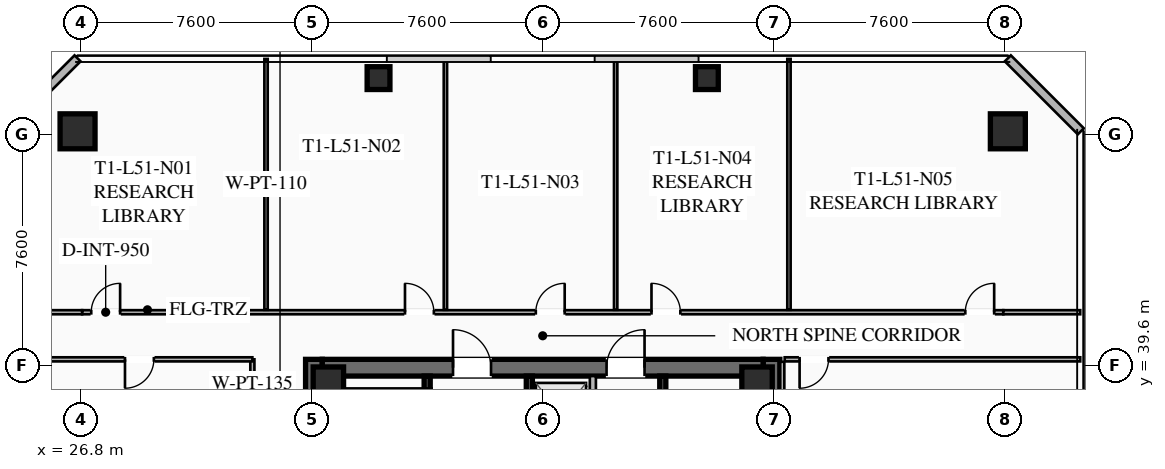
"""IFC4 building model, lengths in metres.
Left out: names, types, materials, properties, quantities, classifications, styles, units other than length and angle.
Written with IfcOpenShell. Run it as: python <this file> out.ifc"""

import sys

from ifc_helpers import new_model, si_unit, direction, frame, frame_2d, origin, origin_2d, place, context, subcontext, project, spatial, rectangle, hollow_rectangle, extrude, element, fill, save


model = new_model("IFC4")
c1 = context("Model", 3, precision=1e-05, world=origin(), true_north=direction((0.0, 1.0)))
c2 = subcontext(c1, "Body", "Model", "MODEL_VIEW")
j1 = project(units=[si_unit("LENGTHUNIT", "METRE"), si_unit("PLANEANGLEUNIT", "RADIAN")], contexts=[c1])
p1 = place(None, origin())
s1 = spatial("IfcSite", under=j1, at=p1, CompositionType="ELEMENT")
p2 = place(p1, origin())
s2 = spatial("IfcBuilding", under=s1, at=p2, CompositionType="ELEMENT")
p3 = place(p2, frame((0.0, 0.0, 188.95)))
s3 = spatial("IfcBuildingStorey", under=s2, at=p3, CompositionType="ELEMENT", Elevation=188.95)
for number, where, z_axis, x_axis in (
    (1, (34.475, 24.2, 0.0), (0.0, 0.0, 1.0), (0.0, 1.0, 0.0)),
    (2, (49.525, 39.8, 0.0), (0.0, 0.0, 1.0), (0.0, -1.0, 0.0)),
):
    element("IfcWall", number, at=place(p3, frame(where, z_axis=z_axis, x_axis=x_axis)), inside=s3, PredefinedType="SHEAR", context=c2, shape_type="SweptSolid", body=[
        extrude(rectangle(XDim=15.6, YDim=0.55, at=frame_2d((7.8, 0.0))), origin(), (0.0, 0.0, 1.0), 3.55),
    ])
p4 = place(p3, frame((34.75, 39.525, 0.0), z_axis=(0.0, 0.0, 1.0), x_axis=(1.0, 0.0, 0.0)))
e3 = element("IfcWall", 3, at=p4, inside=s3, PredefinedType="SHEAR", context=c2, shape_type="SweptSolid", body=[
    extrude(rectangle(XDim=14.5, YDim=0.55, at=frame_2d((7.25, 0.0))), origin(), (0.0, 0.0, 1.0), 3.55),
])
p5 = place(p4, frame((4.3, 0.0, 0.0)))
e4 = element("IfcOpeningElement", 4, at=p5, cuts=e3, PredefinedType="OPENING", context=c2, shape_type="SweptSolid", body=[
    extrude(rectangle(XDim=1.25, YDim=2.25, at=frame_2d((0.625, 1.125))), frame((0.0, 0.285, 0.0), z_axis=(0.0, -1.0, 0.0), x_axis=(1.0, 0.0, 0.0)), (0.0, 0.0, 1.0), 0.57),
])
p6 = place(p4, frame((9.35, 0.0, 0.0)))
e5 = element("IfcOpeningElement", 5, at=p6, cuts=e3, PredefinedType="OPENING", context=c2, shape_type="SweptSolid", body=[
    extrude(rectangle(XDim=1.25, YDim=2.25, at=frame_2d((0.625, 1.125))), frame((0.0, 0.285, 0.0), z_axis=(0.0, -1.0, 0.0), x_axis=(1.0, 0.0, 0.0)), (0.0, 0.0, 1.0), 0.57),
])
for number, where, z_axis, x_axis in (
    (6, (49.05, 39.05, 0.0), (0.0, 0.0, 1.0), (1.0, 0.0, 0.0)),
    (7, (34.95, 39.05, 0.0), (0.0, 0.0, 1.0), (1.0, 0.0, 0.0)),
):
    element("IfcColumn", number, at=place(p3, frame(where, z_axis=z_axis, x_axis=x_axis)), inside=s3, PredefinedType="COLUMN", context=c2, shape_type="SweptSolid", body=[
        extrude(hollow_rectangle(XDim=1.0, YDim=1.0, WallThickness=0.04, at=origin_2d()), origin(), (0.0, 0.0, 1.0), 3.37),
    ])
for number, where, z_axis, x_axis in (
    (8, (57.3, 47.3, 0.0), (0.0, 0.0, 1.0), (1.0, 0.0, 0.0)),
    (9, (26.7, 47.3, 0.0), (0.0, 0.0, 1.0), (1.0, 0.0, 0.0)),
):
    element("IfcColumn", number, at=place(p3, frame(where, z_axis=z_axis, x_axis=x_axis)), inside=s3, PredefinedType="COLUMN", context=c2, shape_type="SweptSolid", body=[
        extrude(hollow_rectangle(XDim=1.15, YDim=1.15, WallThickness=0.045, at=origin_2d()), origin(), (0.0, 0.0, 1.0), 3.37),
    ])
for number, where, z_axis, x_axis in (
    (10, (47.4, 49.05, 0.0), (0.0, 0.0, 1.0), (1.0, 0.0, 0.0)),
    (11, (36.6, 49.05, 0.0), (0.0, 0.0, 1.0), (1.0, 0.0, 0.0)),
):
    element("IfcColumn", number, at=place(p3, frame(where, z_axis=z_axis, x_axis=x_axis)), inside=s3, PredefinedType="COLUMN", context=c2, shape_type="SweptSolid", body=[
        extrude(hollow_rectangle(XDim=0.75, YDim=0.75, WallThickness=0.032, at=origin_2d()), origin(), (0.0, 0.0, 1.0), 3.37),
    ])
for number, where, z_axis, x_axis in (
    (12, (24.3, 47.3, 0.0), (0.0, 0.0, 1.0), (0.707, 0.707, 0.0)),
    (13, (57.3, 49.7, 0.0), (0.0, 0.0, 1.0), (0.707, -0.707, 0.0)),
):
    element("IfcWall", number, at=place(p3, frame(where, z_axis=z_axis, x_axis=x_axis)), inside=s3, PredefinedType="SOLIDWALL", context=c2, shape_type="SweptSolid", body=[
        extrude(rectangle(XDim=3.394, YDim=0.28, at=frame_2d((1.697, 0.0))), origin(), (0.0, 0.0, 1.0), 3.37),
    ])
p7 = place(p3, frame((38.2, 31.2, 0.0), z_axis=(0.0, 0.0, 1.0), x_axis=(0.0, 1.0, 0.0)))
e14 = element("IfcWall", 14, at=p7, inside=s3, PredefinedType="SHEAR", context=c2, shape_type="SweptSolid", body=[
    extrude(rectangle(XDim=8.05, YDim=0.2, at=frame_2d((4.025, 0.0))), origin(), (0.0, 0.0, 1.0), 3.37),
])
p8 = place(p7, frame((0.45, 0.0, 0.0)))
e15 = element("IfcOpeningElement", 15, at=p8, cuts=e14, PredefinedType="OPENING", context=c2, shape_type="SweptSolid", body=[
    extrude(rectangle(XDim=1.15, YDim=2.2, at=frame_2d((0.575, 1.1))), frame((0.0, 0.11, 0.0), z_axis=(0.0, -1.0, 0.0), x_axis=(1.0, 0.0, 0.0)), (0.0, 0.0, 1.0), 0.22),
])
p9 = place(p3, frame((41.56, 24.75, 0.0), z_axis=(0.0, 0.0, 1.0), x_axis=(0.0, 1.0, 0.0)))
e16 = element("IfcWall", 16, at=p9, inside=s3, PredefinedType="SHEAR", context=c2, shape_type="SweptSolid", body=[
    extrude(rectangle(XDim=14.5, YDim=0.2, at=frame_2d((7.25, 0.0))), origin(), (0.0, 0.0, 1.0), 3.37),
])
p10 = place(p3, frame((45.95, 39.25, 0.0), z_axis=(0.0, 0.0, 1.0), x_axis=(0.0, -1.0, 0.0)))
e17 = element("IfcWall", 17, at=p10, inside=s3, PredefinedType="SHEAR", context=c2, shape_type="SweptSolid", body=[
    extrude(rectangle(XDim=6.45, YDim=0.2, at=frame_2d((3.225, 0.0))), origin(), (0.0, 0.0, 1.0), 3.37),
])
p11 = place(p3, frame((43.65, 32.35, 0.0), z_axis=(0.0, 0.0, 1.0), x_axis=(0.0, 1.0, 0.0)))
e18 = element("IfcWall", 18, at=p11, inside=s3, PredefinedType="SOLIDWALL", context=c2, shape_type="SweptSolid", body=[
    extrude(rectangle(XDim=6.9, YDim=0.2, at=frame_2d((3.45, 0.0))), origin(), (0.0, 0.0, 1.0), 3.37),
])
p12 = place(p11, frame((0.575, 0.0, 0.0)))
e19 = element("IfcOpeningElement", 19, at=p12, cuts=e18, PredefinedType="OPENING", context=c2, shape_type="SweptSolid", body=[
    extrude(rectangle(XDim=1.1, YDim=2.2, at=frame_2d((0.55, 1.1))), frame((0.0, 0.11, 0.0), z_axis=(0.0, -1.0, 0.0), x_axis=(1.0, 0.0, 0.0)), (0.0, 0.0, 1.0), 0.22),
])
p13 = place(p11, frame((2.825, 0.0, 0.0)))
e20 = element("IfcOpeningElement", 20, at=p13, cuts=e18, PredefinedType="OPENING", context=c2, shape_type="SweptSolid", body=[
    extrude(rectangle(XDim=1.1, YDim=2.2, at=frame_2d((0.55, 1.1))), frame((0.0, 0.11, 0.0), z_axis=(0.0, -1.0, 0.0), x_axis=(1.0, 0.0, 0.0)), (0.0, 0.0, 1.0), 0.22),
])
p14 = place(p11, frame((5.075, 0.0, 0.0)))
e21 = element("IfcOpeningElement", 21, at=p14, cuts=e18, PredefinedType="OPENING", context=c2, shape_type="SweptSolid", body=[
    extrude(rectangle(XDim=1.1, YDim=2.2, at=frame_2d((0.55, 1.1))), frame((0.0, 0.11, 0.0), z_axis=(0.0, -1.0, 0.0), x_axis=(1.0, 0.0, 0.0)), (0.0, 0.0, 1.0), 0.22),
])
p15 = place(p3, frame((32.45, 35.4, 0.0), z_axis=(0.0, 0.0, 1.0), x_axis=(0.0, 1.0, 0.0)))
e22 = element("IfcWall", 22, at=p15, inside=s3, PredefinedType="PARTITIONING", context=c2, shape_type="SweptSolid", body=[
    extrude(rectangle(XDim=4.4, YDim=0.135, at=frame_2d((2.2, 0.0))), origin(), (0.0, 0.0, 1.0), 2.723),
])
p16 = place(p3, frame((26.85, 41.35, 0.0), z_axis=(0.0, 0.0, 1.0), x_axis=(1.0, 0.0, 0.0)))
e23 = element("IfcWall", 23, at=p16, inside=s3, PredefinedType="PARTITIONING", context=c2, shape_type="SweptSolid", body=[
    extrude(rectangle(XDim=30.3, YDim=0.135, at=frame_2d((15.15, 0.0))), origin(), (0.0, 0.0, 1.0), 2.723),
])
p17 = place(p16, frame((0.3, 0.0, 0.0)))
e24 = element("IfcOpeningElement", 24, at=p17, cuts=e23, PredefinedType="OPENING", context=c2, shape_type="SweptSolid", body=[
    extrude(rectangle(XDim=0.95, YDim=2.05, at=frame_2d((0.475, 1.025))), frame((0.0, 0.077, 0.0), z_axis=(0.0, -1.0, 0.0), x_axis=(1.0, 0.0, 0.0)), (0.0, 0.0, 1.0), 0.155),
])
p18 = place(p16, frame((10.62, 0.0, 0.0)))
e25 = element("IfcOpeningElement", 25, at=p18, cuts=e23, PredefinedType="OPENING", context=c2, shape_type="SweptSolid", body=[
    extrude(rectangle(XDim=0.95, YDim=2.05, at=frame_2d((0.475, 1.025))), frame((0.0, 0.077, 0.0), z_axis=(0.0, -1.0, 0.0), x_axis=(1.0, 0.0, 0.0)), (0.0, 0.0, 1.0), 0.155),
])
p19 = place(p16, frame((14.923, 0.0, 0.0)))
e26 = element("IfcOpeningElement", 26, at=p19, cuts=e23, PredefinedType="OPENING", context=c2, shape_type="SweptSolid", body=[
    extrude(rectangle(XDim=0.95, YDim=2.05, at=frame_2d((0.475, 1.025))), frame((0.0, 0.077, 0.0), z_axis=(0.0, -1.0, 0.0), x_axis=(1.0, 0.0, 0.0)), (0.0, 0.0, 1.0), 0.155),
])
p20 = place(p16, frame((18.728, 0.0, 0.0)))
e27 = element("IfcOpeningElement", 27, at=p20, cuts=e23, PredefinedType="OPENING", context=c2, shape_type="SweptSolid", body=[
    extrude(rectangle(XDim=0.95, YDim=2.05, at=frame_2d((0.475, 1.025))), frame((0.0, 0.077, 0.0), z_axis=(0.0, -1.0, 0.0), x_axis=(1.0, 0.0, 0.0)), (0.0, 0.0, 1.0), 0.155),
])
p21 = place(p16, frame((29.05, 0.0, 0.0)))
e28 = element("IfcOpeningElement", 28, at=p21, cuts=e23, PredefinedType="OPENING", context=c2, shape_type="SweptSolid", body=[
    extrude(rectangle(XDim=0.95, YDim=2.05, at=frame_2d((0.475, 1.025))), frame((0.0, 0.077, 0.0), z_axis=(0.0, -1.0, 0.0), x_axis=(1.0, 0.0, 0.0)), (0.0, 0.0, 1.0), 0.155),
])
for number, where, z_axis, x_axis in (
    (29, (24.32, 41.35, 0.0), (0.0, 0.0, 1.0), (1.0, 0.0, 0.0)),
    (30, (57.15, 41.35, 0.0), (0.0, 0.0, 1.0), (1.0, 0.0, 0.0)),
):
    element("IfcWall", number, at=place(p3, frame(where, z_axis=z_axis, x_axis=x_axis)), inside=s3, PredefinedType="PARTITIONING", context=c2, shape_type="SweptSolid", body=[
        extrude(rectangle(XDim=2.53, YDim=0.135, at=frame_2d((1.265, 0.0))), origin(), (0.0, 0.0, 1.0), 2.723),
    ])
for number, where, z_axis, x_axis in (
    (31, (32.9, 41.43, 0.0), (0.0, 0.0, 1.0), (0.0, 1.0, 0.0)),
    (32, (38.8, 41.43, 0.0), (0.0, 0.0, 1.0), (0.0, 1.0, 0.0)),
    (33, (44.4, 41.43, 0.0), (0.0, 0.0, 1.0), (0.0, 1.0, 0.0)),
    (34, (50.1, 41.43, 0.0), (0.0, 0.0, 1.0), (0.0, 1.0, 0.0)),
):
    element("IfcWall", number, at=place(p3, frame(where, z_axis=z_axis, x_axis=x_axis)), inside=s3, PredefinedType="PARTITIONING", context=c2, shape_type="SweptSolid", body=[
        extrude(rectangle(XDim=8.25, YDim=0.11, at=frame_2d((4.125, 0.0))), origin(), (0.0, 0.0, 1.0), 2.723),
    ])
p22 = place(p3, frame((49.88, 39.72, 0.0), z_axis=(0.0, 0.0, 1.0), x_axis=(0.0, -1.0, 0.0)))
e35 = element("IfcWall", 35, at=p22, inside=s3, PredefinedType="PARTITIONING", context=c2, shape_type="SweptSolid", body=[
    extrude(rectangle(XDim=15.44, YDim=0.135, at=frame_2d((7.72, 0.0))), origin(), (0.0, 0.0, 1.0), 2.723),
])
p23 = place(p3, frame((59.68, 39.8, 0.0), z_axis=(0.0, 0.0, 1.0), x_axis=(-1.0, 0.0, 0.0)))
e36 = element("IfcWall", 36, at=p23, inside=s3, PredefinedType="PARTITIONING", context=c2, shape_type="SweptSolid", body=[
    extrude(rectangle(XDim=9.72, YDim=0.135, at=frame_2d((4.86, 0.0))), origin(), (0.0, 0.0, 1.0), 2.723),
])
p24 = place(p23, frame((8.28, 0.0, 0.0)))
e37 = element("IfcOpeningElement", 37, at=p24, cuts=e36, PredefinedType="OPENING", context=c2, shape_type="SweptSolid", body=[
    extrude(rectangle(XDim=0.95, YDim=2.05, at=frame_2d((0.475, 1.025))), frame((0.0, 0.077, 0.0), z_axis=(0.0, -1.0, 0.0), x_axis=(1.0, 0.0, 0.0)), (0.0, 0.0, 1.0), 0.155),
])
p25 = place(p3, frame((32.45, 39.8, 0.0), z_axis=(0.0, 0.0, 1.0), x_axis=(-1.0, 0.0, 0.0)))
e38 = element("IfcWall", 38, at=p25, inside=s3, PredefinedType="PARTITIONING", context=c2, shape_type="SweptSolid", body=[
    extrude(rectangle(XDim=7.98, YDim=0.135, at=frame_2d((3.99, 0.0))), origin(), (0.0, 0.0, 1.0), 2.723),
])
p26 = place(p25, frame((3.24, 0.0, 0.0)))
e39 = element("IfcOpeningElement", 39, at=p26, cuts=e38, PredefinedType="OPENING", context=c2, shape_type="SweptSolid", body=[
    extrude(rectangle(XDim=0.95, YDim=2.05, at=frame_2d((0.475, 1.025))), frame((0.0, 0.077, 0.0), z_axis=(0.0, -1.0, 0.0), x_axis=(1.0, 0.0, 0.0)), (0.0, 0.0, 1.0), 0.155),
])
p27 = place(p5, origin())
e40 = element("IfcDoor", 40, at=p27, inside=s3, OperationType="SINGLE_SWING_LEFT", PredefinedType="DOOR", context=c2, shape_type="SweptSolid", body=[
    extrude(rectangle(XDim=1.25, YDim=2.25, at=frame_2d((0.625, 1.125))), frame((0.0, 0.025, 0.0), z_axis=(0.0, -1.0, 0.0), x_axis=(1.0, 0.0, 0.0)), (0.0, 0.0, 1.0), 0.05),
])
fill(e4, e40)
p28 = place(p6, origin())
e41 = element("IfcDoor", 41, at=p28, inside=s3, OperationType="SINGLE_SWING_RIGHT", PredefinedType="DOOR", context=c2, shape_type="SweptSolid", body=[
    extrude(rectangle(XDim=1.25, YDim=2.25, at=frame_2d((0.625, 1.125))), frame((0.0, 0.025, 0.0), z_axis=(0.0, -1.0, 0.0), x_axis=(1.0, 0.0, 0.0)), (0.0, 0.0, 1.0), 0.05),
])
fill(e5, e41)
p29 = place(p17, origin())
e42 = element("IfcDoor", 42, at=p29, inside=s3, OperationType="SINGLE_SWING_RIGHT", PredefinedType="DOOR", context=c2, shape_type="SweptSolid", body=[
    extrude(rectangle(XDim=0.95, YDim=2.05, at=frame_2d((0.475, 1.025))), frame((0.0, 0.025, 0.0), z_axis=(0.0, -1.0, 0.0), x_axis=(1.0, 0.0, 0.0)), (0.0, 0.0, 1.0), 0.05),
])
fill(e24, e42)
p30 = place(p18, origin())
e43 = element("IfcDoor", 43, at=p30, inside=s3, OperationType="SINGLE_SWING_LEFT", PredefinedType="DOOR", context=c2, shape_type="SweptSolid", body=[
    extrude(rectangle(XDim=0.95, YDim=2.05, at=frame_2d((0.475, 1.025))), frame((0.0, 0.025, 0.0), z_axis=(0.0, -1.0, 0.0), x_axis=(1.0, 0.0, 0.0)), (0.0, 0.0, 1.0), 0.05),
])
fill(e25, e43)
p31 = place(p19, origin())
e44 = element("IfcDoor", 44, at=p31, inside=s3, OperationType="SINGLE_SWING_RIGHT", PredefinedType="DOOR", context=c2, shape_type="SweptSolid", body=[
    extrude(rectangle(XDim=0.95, YDim=2.05, at=frame_2d((0.475, 1.025))), frame((0.0, 0.025, 0.0), z_axis=(0.0, -1.0, 0.0), x_axis=(1.0, 0.0, 0.0)), (0.0, 0.0, 1.0), 0.05),
])
fill(e26, e44)
p32 = place(p20, origin())
e45 = element("IfcDoor", 45, at=p32, inside=s3, OperationType="SINGLE_SWING_LEFT", PredefinedType="DOOR", context=c2, shape_type="SweptSolid", body=[
    extrude(rectangle(XDim=0.95, YDim=2.05, at=frame_2d((0.475, 1.025))), frame((0.0, 0.025, 0.0), z_axis=(0.0, -1.0, 0.0), x_axis=(1.0, 0.0, 0.0)), (0.0, 0.0, 1.0), 0.05),
])
fill(e27, e45)
p33 = place(p21, origin())
e46 = element("IfcDoor", 46, at=p33, inside=s3, OperationType="SINGLE_SWING_RIGHT", PredefinedType="DOOR", context=c2, shape_type="SweptSolid", body=[
    extrude(rectangle(XDim=0.95, YDim=2.05, at=frame_2d((0.475, 1.025))), frame((0.0, 0.025, 0.0), z_axis=(0.0, -1.0, 0.0), x_axis=(1.0, 0.0, 0.0)), (0.0, 0.0, 1.0), 0.05),
])
fill(e28, e46)
p34 = place(p24, origin())
e47 = element("IfcDoor", 47, at=p34, inside=s3, OperationType="SINGLE_SWING_RIGHT", PredefinedType="DOOR", context=c2, shape_type="SweptSolid", body=[
    extrude(rectangle(XDim=0.95, YDim=2.05, at=frame_2d((0.475, 1.025))), frame((0.0, 0.025, 0.0), z_axis=(0.0, -1.0, 0.0), x_axis=(1.0, 0.0, 0.0)), (0.0, 0.0, 1.0), 0.05),
])
fill(e37, e47)
p35 = place(p26, origin())
e48 = element("IfcDoor", 48, at=p35, inside=s3, OperationType="SINGLE_SWING_RIGHT", PredefinedType="DOOR", context=c2, shape_type="SweptSolid", body=[
    extrude(rectangle(XDim=0.95, YDim=2.05, at=frame_2d((0.475, 1.025))), frame((0.0, 0.025, 0.0), z_axis=(0.0, -1.0, 0.0), x_axis=(1.0, 0.0, 0.0)), (0.0, 0.0, 1.0), 0.05),
])
fill(e39, e48)
save(model, sys.argv[1])
